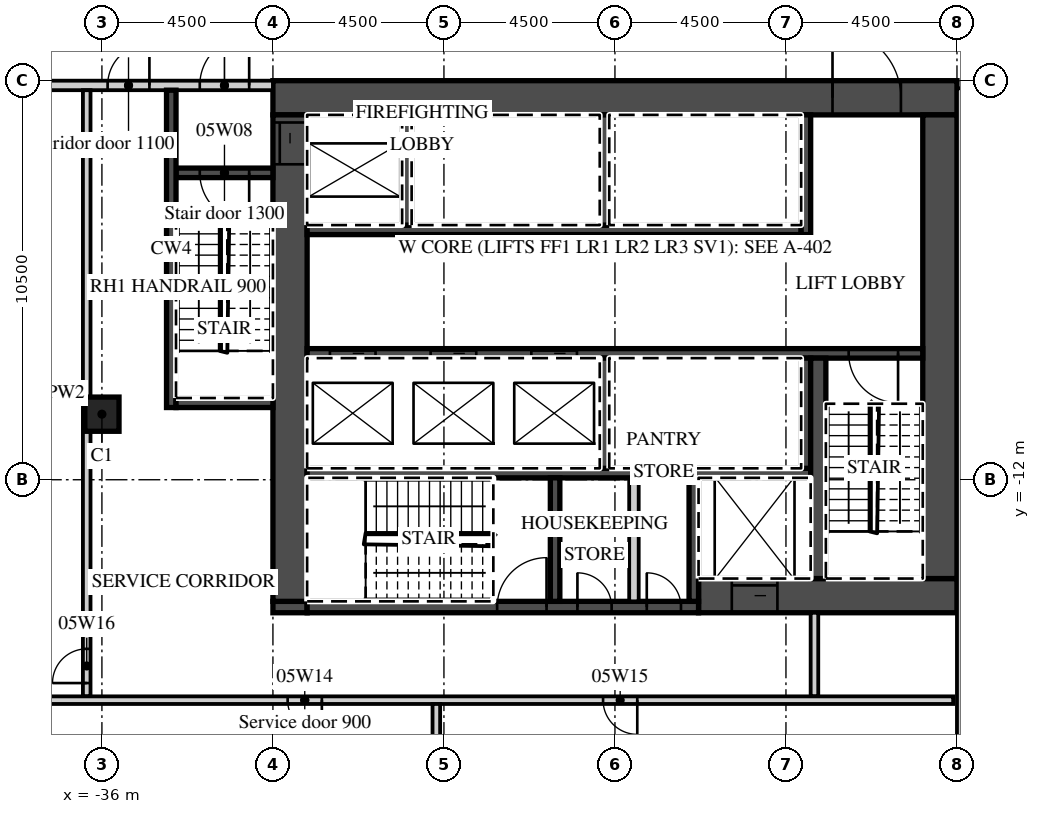
"""IFC4 building model, lengths in metres.
Left out: names, types, materials, properties, quantities, classifications, styles, units other than length and angle.
Written with IfcOpenShell. Run it as: python <this file> out.ifc"""

import sys

from ifc_helpers import new_model, si_unit, direction, frame, frame_2d, origin, origin_2d, place, context, subcontext, project, spatial, rectangle, extrude, element, fill, save


model = new_model("IFC4")
c1 = context("Model", 3, precision=1e-05, world=origin(), true_north=direction((0.0, 1.0)))
c2 = subcontext(c1, "Body", "Model", "MODEL_VIEW")
j1 = project(units=[si_unit("LENGTHUNIT", "METRE"), si_unit("PLANEANGLEUNIT", "RADIAN")], contexts=[c1])
p1 = place(None, origin())
s1 = spatial("IfcSite", under=j1, at=p1, CompositionType="ELEMENT")
p2 = place(p1, origin())
s2 = spatial("IfcBuilding", under=s1, at=p2, CompositionType="ELEMENT")
p3 = place(p2, frame((0.0, 0.0, 33.5)))
s3 = spatial("IfcBuildingStorey", under=s2, at=p3, CompositionType="ELEMENT", Elevation=33.5)
p4 = place(p3, frame((-36.0, -10.275, 0.0), z_axis=(0.0, 0.0, 1.0), x_axis=(1.0, 0.0, 0.0)))
e1 = element("IfcColumn", 1, at=p4, inside=s3, PredefinedType="COLUMN", context=c2, shape_type="SweptSolid", body=[
    extrude(rectangle(XDim=0.9, YDim=0.9, at=origin_2d()), origin(), (0.0, 0.0, 1.0), 4.5),
])
p5 = place(p3, frame((-31.5, -1.95, 0.0), z_axis=(0.0, 0.0, 1.0), x_axis=(1.0, 0.0, 0.0)))
e2 = element("IfcWall", 2, at=p5, inside=s3, PredefinedType="SHEAR", context=c2, shape_type="SweptSolid", body=[
    extrude(rectangle(XDim=18.0, YDim=0.9, at=frame_2d((9.0, 0.0))), origin(), (0.0, 0.0, 1.0), 4.05),
])
p6 = place(p5, frame((14.725, 0.0, 0.0)))
e3 = element("IfcOpeningElement", 3, at=p6, cuts=e2, PredefinedType="OPENING", context=c2, shape_type="SweptSolid", body=[
    extrude(rectangle(XDim=1.8, YDim=2.1, at=frame_2d((0.9, 1.05))), frame((0.0, 0.46, 0.0), z_axis=(0.0, -1.0, 0.0), x_axis=(1.0, 0.0, 0.0)), (0.0, 0.0, 1.0), 0.92),
])
p7 = place(p3, frame((-20.3, -15.05, 0.0), z_axis=(0.0, 0.0, 1.0), x_axis=(1.0, 0.0, 0.0)))
e4 = element("IfcWall", 4, at=p7, inside=s3, PredefinedType="SHEAR", context=c2, shape_type="SweptSolid", body=[
    extrude(rectangle(XDim=6.8, YDim=0.9, at=frame_2d((3.4, 0.0))), origin(), (0.0, 0.0, 1.0), 4.05),
])
p8 = place(p7, frame((0.875, 0.0, 0.0)))
e5 = element("IfcOpeningElement", 5, at=p8, cuts=e4, PredefinedType="OPENING", context=c2, shape_type="SweptSolid", body=[
    extrude(rectangle(XDim=1.2, YDim=2.1, at=frame_2d((0.6, 1.05))), frame((0.0, 0.46, 0.0), z_axis=(0.0, -1.0, 0.0), x_axis=(1.0, 0.0, 0.0)), (0.0, 0.0, 1.0), 0.92),
])
p9 = place(p3, frame((-31.5, -15.35, 0.0), z_axis=(0.0, 0.0, 1.0), x_axis=(1.0, 0.0, 0.0)))
e6 = element("IfcWall", 6, at=p9, inside=s3, PredefinedType="SHEAR", context=c2, shape_type="SweptSolid", body=[
    extrude(rectangle(XDim=0.9, YDim=0.3, at=frame_2d((0.45, 0.0))), origin(), (0.0, 0.0, 1.0), 4.05),
])
p10 = place(p3, frame((-30.6, -15.35, 0.0), z_axis=(0.0, 0.0, 1.0), x_axis=(1.0, 0.0, 0.0)))
e7 = element("IfcWall", 7, at=p10, inside=s3, PredefinedType="SHEAR", context=c2, shape_type="SweptSolid", body=[
    extrude(rectangle(XDim=10.3, YDim=0.3, at=frame_2d((5.15, 0.0))), origin(), (0.0, 0.0, 1.0), 4.05),
])
p11 = place(p10, frame((5.0, 0.0, 0.0)))
e8 = element("IfcOpeningElement", 8, at=p11, cuts=e7, PredefinedType="OPENING", context=c2, shape_type="SweptSolid", body=[
    extrude(rectangle(XDim=1.3, YDim=2.1, at=frame_2d((0.65, 1.05))), frame((0.0, 0.16, 0.0), z_axis=(0.0, -1.0, 0.0), x_axis=(1.0, 0.0, 0.0)), (0.0, 0.0, 1.0), 0.32),
])
p12 = place(p10, frame((7.113, 0.0, 0.0)))
e9 = element("IfcOpeningElement", 9, at=p12, cuts=e7, PredefinedType="OPENING", context=c2, shape_type="SweptSolid", body=[
    extrude(rectangle(XDim=0.9, YDim=2.1, at=frame_2d((0.45, 1.05))), frame((0.0, 0.16, 0.0), z_axis=(0.0, -1.0, 0.0), x_axis=(1.0, 0.0, 0.0)), (0.0, 0.0, 1.0), 0.32),
])
p13 = place(p10, frame((8.938, 0.0, 0.0)))
e10 = element("IfcOpeningElement", 10, at=p13, cuts=e7, PredefinedType="OPENING", context=c2, shape_type="SweptSolid", body=[
    extrude(rectangle(XDim=0.9, YDim=2.1, at=frame_2d((0.45, 1.05))), frame((0.0, 0.16, 0.0), z_axis=(0.0, -1.0, 0.0), x_axis=(1.0, 0.0, 0.0)), (0.0, 0.0, 1.0), 0.32),
])
p14 = place(p3, frame((-31.05, -15.2, 0.0), z_axis=(0.0, 0.0, 1.0), x_axis=(0.0, 1.0, 0.0)))
e11 = element("IfcWall", 11, at=p14, inside=s3, PredefinedType="SHEAR", context=c2, shape_type="SweptSolid", body=[
    extrude(rectangle(XDim=12.8, YDim=0.9, at=frame_2d((6.4, 0.0))), origin(), (0.0, 0.0, 1.0), 4.05),
])
p15 = place(p14, frame((11.5, 0.0, 0.0)))
e12 = element("IfcOpeningElement", 12, at=p15, cuts=e11, PredefinedType="OPENING", context=c2, shape_type="SweptSolid", body=[
    extrude(rectangle(XDim=1.1, YDim=2.1, at=frame_2d((0.55, 1.05))), frame((0.0, 0.46, 0.0), z_axis=(0.0, -1.0, 0.0), x_axis=(1.0, 0.0, 0.0)), (0.0, 0.0, 1.0), 0.92),
])
p16 = place(p3, frame((-13.95, -14.6, 0.0), z_axis=(0.0, 0.0, 1.0), x_axis=(0.0, 1.0, 0.0)))
e13 = element("IfcWall", 13, at=p16, inside=s3, PredefinedType="SHEAR", context=c2, shape_type="SweptSolid", body=[
    extrude(rectangle(XDim=12.2, YDim=0.9, at=frame_2d((6.1, 0.0))), origin(), (0.0, 0.0, 1.0), 4.05),
])
p17 = place(p3, frame((-30.6, -5.425, 0.0), z_axis=(0.0, 0.0, 1.0), x_axis=(1.0, 0.0, 0.0)))
e14 = element("IfcWall", 14, at=p17, inside=s3, PredefinedType="SHEAR", context=c2, shape_type="SweptSolid", body=[
    extrude(rectangle(XDim=13.0, YDim=0.25, at=frame_2d((6.5, 0.0))), origin(), (0.0, 0.0, 1.0), 4.05),
])
p18 = place(p3, frame((-17.475, -5.55, 0.0), z_axis=(0.0, 0.0, 1.0), x_axis=(0.0, 1.0, 0.0)))
e15 = element("IfcWall", 15, at=p18, inside=s3, PredefinedType="SHEAR", context=c2, shape_type="SweptSolid", body=[
    extrude(rectangle(XDim=3.15, YDim=0.25, at=frame_2d((1.575, 0.0))), origin(), (0.0, 0.0, 1.0), 4.05),
])
for number, where, z_axis, x_axis in (
    (16, (-27.975, -5.3, 0.0), (0.0, 0.0, 1.0), (0.0, 1.0, 0.0)),
    (17, (-22.775, -5.3, 0.0), (0.0, 0.0, 1.0), (0.0, 1.0, 0.0)),
):
    element("IfcWall", number, at=place(p3, frame(where, z_axis=z_axis, x_axis=x_axis)), inside=s3, PredefinedType="SHEAR", context=c2, shape_type="SweptSolid", body=[
        extrude(rectangle(XDim=2.9, YDim=0.25, at=frame_2d((1.45, 0.0))), origin(), (0.0, 0.0, 1.0), 4.05),
    ])
p19 = place(p3, frame((-30.6, -8.675, 0.0), z_axis=(0.0, 0.0, 1.0), x_axis=(1.0, 0.0, 0.0)))
e18 = element("IfcWall", 18, at=p19, inside=s3, PredefinedType="SHEAR", context=c2, shape_type="SweptSolid", body=[
    extrude(rectangle(XDim=16.2, YDim=0.25, at=frame_2d((8.1, 0.0))), origin(), (0.0, 0.0, 1.0), 4.05),
])
p20 = place(p19, frame((0.6, 0.0, 0.0)))
e19 = element("IfcOpeningElement", 19, at=p20, cuts=e18, PredefinedType="OPENING", context=c2, shape_type="SweptSolid", body=[
    extrude(rectangle(XDim=1.2, YDim=2.1, at=frame_2d((0.6, 1.05))), frame((0.0, 0.135, 0.0), z_axis=(0.0, -1.0, 0.0), x_axis=(1.0, 0.0, 0.0)), (0.0, 0.0, 1.0), 0.27),
])
p21 = place(p19, frame((3.25, 0.0, 0.0)))
e20 = element("IfcOpeningElement", 20, at=p21, cuts=e18, PredefinedType="OPENING", context=c2, shape_type="SweptSolid", body=[
    extrude(rectangle(XDim=1.2, YDim=2.1, at=frame_2d((0.6, 1.05))), frame((0.0, 0.135, 0.0), z_axis=(0.0, -1.0, 0.0), x_axis=(1.0, 0.0, 0.0)), (0.0, 0.0, 1.0), 0.27),
])
p22 = place(p19, frame((5.9, 0.0, 0.0)))
e21 = element("IfcOpeningElement", 21, at=p22, cuts=e18, PredefinedType="OPENING", context=c2, shape_type="SweptSolid", body=[
    extrude(rectangle(XDim=1.2, YDim=2.1, at=frame_2d((0.6, 1.05))), frame((0.0, 0.135, 0.0), z_axis=(0.0, -1.0, 0.0), x_axis=(1.0, 0.0, 0.0)), (0.0, 0.0, 1.0), 0.27),
])
p23 = place(p19, frame((14.25, 0.0, 0.0)))
e22 = element("IfcOpeningElement", 22, at=p23, cuts=e18, PredefinedType="OPENING", context=c2, shape_type="SweptSolid", body=[
    extrude(rectangle(XDim=1.3, YDim=2.1, at=frame_2d((0.65, 1.05))), frame((0.0, 0.135, 0.0), z_axis=(0.0, -1.0, 0.0), x_axis=(1.0, 0.0, 0.0)), (0.0, 0.0, 1.0), 0.27),
])
p24 = place(p3, frame((-30.6, -11.825, 0.0), z_axis=(0.0, 0.0, 1.0), x_axis=(1.0, 0.0, 0.0)))
e23 = element("IfcWall", 23, at=p24, inside=s3, PredefinedType="SHEAR", context=c2, shape_type="SweptSolid", body=[
    extrude(rectangle(XDim=13.25, YDim=0.25, at=frame_2d((6.625, 0.0))), origin(), (0.0, 0.0, 1.0), 4.05),
])
for number, where, z_axis, x_axis in (
    (24, (-17.475, -11.7, 0.0), (0.0, 0.0, 1.0), (0.0, 1.0, 0.0)),
    (25, (-22.775, -11.7, 0.0), (0.0, 0.0, 1.0), (0.0, 1.0, 0.0)),
):
    element("IfcWall", number, at=place(p3, frame(where, z_axis=z_axis, x_axis=x_axis)), inside=s3, PredefinedType="SHEAR", context=c2, shape_type="SweptSolid", body=[
        extrude(rectangle(XDim=2.9, YDim=0.25, at=frame_2d((1.45, 0.0))), origin(), (0.0, 0.0, 1.0), 4.05),
    ])
p25 = place(p3, frame((-17.15, -14.6, 0.0), z_axis=(0.0, 0.0, 1.0), x_axis=(0.0, 1.0, 0.0)))
e26 = element("IfcWall", 26, at=p25, inside=s3, PredefinedType="SHEAR", context=c2, shape_type="SweptSolid", body=[
    extrude(rectangle(XDim=5.8, YDim=0.4, at=frame_2d((2.9, 0.0))), origin(), (0.0, 0.0, 1.0), 4.05),
])
for number, where, z_axis, x_axis in (
    (27, (-20.425, -15.2, 0.0), (0.0, 0.0, 1.0), (0.0, 1.0, 0.0)),
    (28, (-24.075, -15.2, 0.0), (0.0, 0.0, 1.0), (0.0, 1.0, 0.0)),
):
    element("IfcWall", number, at=place(p3, frame(where, z_axis=z_axis, x_axis=x_axis)), inside=s3, PredefinedType="SHEAR", context=c2, shape_type="SweptSolid", body=[
        extrude(rectangle(XDim=3.25, YDim=0.25, at=frame_2d((1.625, 0.0))), origin(), (0.0, 0.0, 1.0), 4.05),
    ])
p26 = place(p3, frame((-22.0, -15.2, 0.0), z_axis=(0.0, 0.0, 1.0), x_axis=(0.0, 1.0, 0.0)))
e29 = element("IfcWall", 29, at=p26, inside=s3, PredefinedType="PARTITIONING", context=c2, shape_type="SweptSolid", body=[
    extrude(rectangle(XDim=3.25, YDim=0.25, at=frame_2d((1.625, 0.0))), origin(), (0.0, 0.0, 1.0), 4.05),
])
p27 = place(p3, frame((-44.55, -1.625, 0.0), z_axis=(0.0, 0.0, 1.0), x_axis=(1.0, 0.0, 0.0)))
e30 = element("IfcWall", 30, at=p27, inside=s3, PredefinedType="PARTITIONING", context=c2, shape_type="SweptSolid", body=[
    extrude(rectangle(XDim=13.05, YDim=0.25, at=frame_2d((6.525, 0.0))), origin(), (0.0, 0.0, 1.0), 4.05),
])
p28 = place(p27, frame((11.125, 0.0, 0.0)))
e31 = element("IfcOpeningElement", 31, at=p28, cuts=e30, PredefinedType="OPENING", context=c2, shape_type="SweptSolid", body=[
    extrude(rectangle(XDim=1.3, YDim=2.1, at=frame_2d((0.65, 1.05))), frame((0.0, 0.135, 0.0), z_axis=(0.0, -1.0, 0.0), x_axis=(1.0, 0.0, 0.0)), (0.0, 0.0, 1.0), 0.27),
])
p29 = place(p27, frame((8.7, 0.0, 0.0)))
e32 = element("IfcOpeningElement", 32, at=p29, cuts=e30, PredefinedType="OPENING", context=c2, shape_type="SweptSolid", body=[
    extrude(rectangle(XDim=1.1, YDim=2.1, at=frame_2d((0.55, 1.05))), frame((0.0, 0.135, 0.0), z_axis=(0.0, -1.0, 0.0), x_axis=(1.0, 0.0, 0.0)), (0.0, 0.0, 1.0), 0.27),
])
p30 = place(p3, frame((-34.05, -3.925, 0.0), z_axis=(0.0, 0.0, 1.0), x_axis=(1.0, 0.0, 0.0)))
e33 = element("IfcWall", 33, at=p30, inside=s3, PredefinedType="SHEAR", context=c2, shape_type="SweptSolid", body=[
    extrude(rectangle(XDim=2.55, YDim=0.25, at=frame_2d((1.275, 0.0))), origin(), (0.0, 0.0, 1.0), 4.05),
])
p31 = place(p30, frame((0.625, 0.0, 0.0)))
e34 = element("IfcOpeningElement", 34, at=p31, cuts=e33, PredefinedType="OPENING", context=c2, shape_type="SweptSolid", body=[
    extrude(rectangle(XDim=1.3, YDim=2.1, at=frame_2d((0.65, 1.05))), frame((0.0, 0.135, 0.0), z_axis=(0.0, -1.0, 0.0), x_axis=(1.0, 0.0, 0.0)), (0.0, 0.0, 1.0), 0.27),
])
p32 = place(p3, frame((-34.175, -10.1, 0.0), z_axis=(0.0, 0.0, 1.0), x_axis=(0.0, 1.0, 0.0)))
e35 = element("IfcWall", 35, at=p32, inside=s3, PredefinedType="SHEAR", context=c2, shape_type="SweptSolid", body=[
    extrude(rectangle(XDim=8.35, YDim=0.25, at=frame_2d((4.175, 0.0))), origin(), (0.0, 0.0, 1.0), 4.05),
])
p33 = place(p3, frame((-34.05, -9.975, 0.0), z_axis=(0.0, 0.0, 1.0), x_axis=(1.0, 0.0, 0.0)))
e36 = element("IfcWall", 36, at=p33, inside=s3, PredefinedType="SHEAR", context=c2, shape_type="SweptSolid", body=[
    extrude(rectangle(XDim=2.55, YDim=0.25, at=frame_2d((1.275, 0.0))), origin(), (0.0, 0.0, 1.0), 4.05),
])
p34 = place(p3, frame((-17.25, -17.7, 0.0), z_axis=(0.0, 0.0, 1.0), x_axis=(0.0, 1.0, 0.0)))
e37 = element("IfcWall", 37, at=p34, inside=s3, PredefinedType="PARTITIONING", context=c2, shape_type="SweptSolid", body=[
    extrude(rectangle(XDim=2.2, YDim=0.2, at=frame_2d((1.1, 0.0))), origin(), (0.0, 0.0, 1.0), 4.05),
])
p35 = place(p3, frame((-36.4, -17.7, 0.0), z_axis=(0.0, 0.0, 1.0), x_axis=(0.0, 1.0, 0.0)))
e38 = element("IfcWall", 38, at=p35, inside=s3, PredefinedType="PARTITIONING", context=c2, shape_type="SweptSolid", body=[
    extrude(rectangle(XDim=15.95, YDim=0.2, at=frame_2d((7.975, 0.0))), origin(), (0.0, 0.0, 1.0), 4.05),
])
p36 = place(p35, frame((0.35, 0.0, 0.0)))
e39 = element("IfcOpeningElement", 39, at=p36, cuts=e38, PredefinedType="OPENING", context=c2, shape_type="SweptSolid", body=[
    extrude(rectangle(XDim=0.9, YDim=2.1, at=frame_2d((0.45, 1.05))), frame((0.0, 0.11, 0.0), z_axis=(0.0, -1.0, 0.0), x_axis=(1.0, 0.0, 0.0)), (0.0, 0.0, 1.0), 0.22),
])
p37 = place(p3, frame((-44.55, -17.8, 0.0), z_axis=(0.0, 0.0, 1.0), x_axis=(1.0, 0.0, 0.0)))
e40 = element("IfcWall", 40, at=p37, inside=s3, PredefinedType="PARTITIONING", context=c2, shape_type="SweptSolid", body=[
    extrude(rectangle(XDim=30.95, YDim=0.2, at=frame_2d((15.475, 0.0))), origin(), (0.0, 0.0, 1.0), 4.05),
])
p38 = place(p37, frame((13.438, 0.0, 0.0)))
e41 = element("IfcOpeningElement", 41, at=p38, cuts=e40, PredefinedType="OPENING", context=c2, shape_type="SweptSolid", body=[
    extrude(rectangle(XDim=0.9, YDim=2.1, at=frame_2d((0.45, 1.05))), frame((0.0, 0.11, 0.0), z_axis=(0.0, -1.0, 0.0), x_axis=(1.0, 0.0, 0.0)), (0.0, 0.0, 1.0), 0.22),
])
p39 = place(p37, frame((21.738, 0.0, 0.0)))
e42 = element("IfcOpeningElement", 42, at=p39, cuts=e40, PredefinedType="OPENING", context=c2, shape_type="SweptSolid", body=[
    extrude(rectangle(XDim=0.9, YDim=2.1, at=frame_2d((0.45, 1.05))), frame((0.0, 0.11, 0.0), z_axis=(0.0, -1.0, 0.0), x_axis=(1.0, 0.0, 0.0)), (0.0, 0.0, 1.0), 0.22),
])
p40 = place(p3, frame((-27.2, -21.55, 0.0), z_axis=(0.0, 0.0, 1.0), x_axis=(0.0, 1.0, 0.0)))
e43 = element("IfcWall", 43, at=p40, inside=s3, PredefinedType="PARTITIONING", context=c2, shape_type="SweptSolid", body=[
    extrude(rectangle(XDim=3.65, YDim=0.2, at=frame_2d((1.825, 0.0))), origin(), (0.0, 0.0, 1.0), 4.05),
])
p41 = place(p3, frame((-13.4, -21.85, 0.0), z_axis=(0.0, 0.0, 1.0), x_axis=(0.0, 1.0, 0.0)))
e44 = element("IfcWall", 44, at=p41, inside=s3, PredefinedType="PARTITIONING", context=c2, shape_type="SweptSolid", body=[
    extrude(rectangle(XDim=20.15, YDim=0.2, at=frame_2d((10.075, 0.0))), origin(), (0.0, 0.0, 1.0), 4.05),
])
p42 = place(p20, origin())
e45 = element("IfcDoor", 45, at=p42, inside=s3, OperationType="SLIDING_TO_LEFT", PredefinedType="DOOR", context=c2, shape_type="SweptSolid", body=[
    extrude(rectangle(XDim=1.2, YDim=2.1, at=frame_2d((0.6, 1.05))), frame((0.0, 0.025, 0.0), z_axis=(0.0, -1.0, 0.0), x_axis=(1.0, 0.0, 0.0)), (0.0, 0.0, 1.0), 0.05),
])
fill(e19, e45)
p43 = place(p21, origin())
e46 = element("IfcDoor", 46, at=p43, inside=s3, OperationType="SLIDING_TO_RIGHT", PredefinedType="DOOR", context=c2, shape_type="SweptSolid", body=[
    extrude(rectangle(XDim=1.2, YDim=2.1, at=frame_2d((0.6, 1.05))), frame((0.0, 0.025, 0.0), z_axis=(0.0, -1.0, 0.0), x_axis=(1.0, 0.0, 0.0)), (0.0, 0.0, 1.0), 0.05),
])
fill(e20, e46)
p44 = place(p22, origin())
e47 = element("IfcDoor", 47, at=p44, inside=s3, OperationType="SLIDING_TO_RIGHT", PredefinedType="DOOR", context=c2, shape_type="SweptSolid", body=[
    extrude(rectangle(XDim=1.2, YDim=2.1, at=frame_2d((0.6, 1.05))), frame((0.0, 0.025, 0.0), z_axis=(0.0, -1.0, 0.0), x_axis=(1.0, 0.0, 0.0)), (0.0, 0.0, 1.0), 0.05),
])
fill(e21, e47)
p45 = place(p8, origin())
e48 = element("IfcDoor", 48, at=p45, inside=s3, OperationType="SLIDING_TO_LEFT", PredefinedType="DOOR", context=c2, shape_type="SweptSolid", body=[
    extrude(rectangle(XDim=1.2, YDim=2.1, at=frame_2d((0.6, 1.05))), frame((0.0, 0.025, 0.0), z_axis=(0.0, -1.0, 0.0), x_axis=(1.0, 0.0, 0.0)), (0.0, 0.0, 1.0), 0.05),
])
fill(e5, e48)
p46 = place(p15, origin())
e49 = element("IfcDoor", 49, at=p46, inside=s3, OperationType="SLIDING_TO_RIGHT", PredefinedType="DOOR", context=c2, shape_type="SweptSolid", body=[
    extrude(rectangle(XDim=1.1, YDim=2.1, at=frame_2d((0.55, 1.05))), frame((0.0, 0.025, 0.0), z_axis=(0.0, -1.0, 0.0), x_axis=(1.0, 0.0, 0.0)), (0.0, 0.0, 1.0), 0.05),
])
fill(e12, e49)
p47 = place(p6, origin())
e50 = element("IfcDoor", 50, at=p47, inside=s3, OperationType="DOUBLE_DOOR_DOUBLE_SWING", PredefinedType="DOOR", context=c2, shape_type="SweptSolid", body=[
    extrude(rectangle(XDim=1.8, YDim=2.1, at=frame_2d((0.9, 1.05))), frame((0.0, 0.025, 0.0), z_axis=(0.0, -1.0, 0.0), x_axis=(1.0, 0.0, 0.0)), (0.0, 0.0, 1.0), 0.05),
])
fill(e3, e50)
p48 = place(p28, origin())
e51 = element("IfcDoor", 51, at=p48, inside=s3, OperationType="SINGLE_SWING_RIGHT", PredefinedType="DOOR", context=c2, shape_type="SweptSolid", body=[
    extrude(rectangle(XDim=1.3, YDim=2.1, at=frame_2d((0.65, 1.05))), frame((0.0, 0.025, 0.0), z_axis=(0.0, -1.0, 0.0), x_axis=(1.0, 0.0, 0.0)), (0.0, 0.0, 1.0), 0.05),
])
fill(e31, e51)
p49 = place(p31, origin())
e52 = element("IfcDoor", 52, at=p49, inside=s3, OperationType="SINGLE_SWING_RIGHT", PredefinedType="DOOR", context=c2, shape_type="SweptSolid", body=[
    extrude(rectangle(XDim=1.3, YDim=2.1, at=frame_2d((0.65, 1.05))), frame((0.0, 0.025, 0.0), z_axis=(0.0, -1.0, 0.0), x_axis=(1.0, 0.0, 0.0)), (0.0, 0.0, 1.0), 0.05),
])
fill(e34, e52)
p50 = place(p29, origin())
e53 = element("IfcDoor", 53, at=p50, inside=s3, OperationType="SINGLE_SWING_RIGHT", PredefinedType="DOOR", context=c2, shape_type="SweptSolid", body=[
    extrude(rectangle(XDim=1.1, YDim=2.1, at=frame_2d((0.55, 1.05))), frame((0.0, 0.025, 0.0), z_axis=(0.0, -1.0, 0.0), x_axis=(1.0, 0.0, 0.0)), (0.0, 0.0, 1.0), 0.05),
])
fill(e32, e53)
p51 = place(p23, origin())
e54 = element("IfcDoor", 54, at=p51, inside=s3, OperationType="SINGLE_SWING_RIGHT", PredefinedType="DOOR", context=c2, shape_type="SweptSolid", body=[
    extrude(rectangle(XDim=1.3, YDim=2.1, at=frame_2d((0.65, 1.05))), frame((0.0, 0.025, 0.0), z_axis=(0.0, -1.0, 0.0), x_axis=(1.0, 0.0, 0.0)), (0.0, 0.0, 1.0), 0.05),
])
fill(e22, e54)
p52 = place(p11, origin())
e55 = element("IfcDoor", 55, at=p52, inside=s3, OperationType="SINGLE_SWING_RIGHT", PredefinedType="DOOR", context=c2, shape_type="SweptSolid", body=[
    extrude(rectangle(XDim=1.3, YDim=2.1, at=frame_2d((0.65, 1.05))), frame((0.0, 0.025, 0.0), z_axis=(0.0, -1.0, 0.0), x_axis=(1.0, 0.0, 0.0)), (0.0, 0.0, 1.0), 0.05),
])
fill(e8, e55)
p53 = place(p12, origin())
e56 = element("IfcDoor", 56, at=p53, inside=s3, OperationType="SINGLE_SWING_LEFT", PredefinedType="DOOR", context=c2, shape_type="SweptSolid", body=[
    extrude(rectangle(XDim=0.9, YDim=2.1, at=frame_2d((0.45, 1.05))), frame((0.0, 0.025, 0.0), z_axis=(0.0, -1.0, 0.0), x_axis=(1.0, 0.0, 0.0)), (0.0, 0.0, 1.0), 0.05),
])
fill(e9, e56)
p54 = place(p13, origin())
e57 = element("IfcDoor", 57, at=p54, inside=s3, OperationType="SINGLE_SWING_LEFT", PredefinedType="DOOR", context=c2, shape_type="SweptSolid", body=[
    extrude(rectangle(XDim=0.9, YDim=2.1, at=frame_2d((0.45, 1.05))), frame((0.0, 0.025, 0.0), z_axis=(0.0, -1.0, 0.0), x_axis=(1.0, 0.0, 0.0)), (0.0, 0.0, 1.0), 0.05),
])
fill(e10, e57)
p55 = place(p38, origin())
e58 = element("IfcDoor", 58, at=p55, inside=s3, OperationType="SINGLE_SWING_RIGHT", PredefinedType="DOOR", context=c2, shape_type="SweptSolid", body=[
    extrude(rectangle(XDim=0.9, YDim=2.1, at=frame_2d((0.45, 1.05))), frame((0.0, 0.025, 0.0), z_axis=(0.0, -1.0, 0.0), x_axis=(1.0, 0.0, 0.0)), (0.0, 0.0, 1.0), 0.05),
])
fill(e41, e58)
p56 = place(p39, origin())
e59 = element("IfcDoor", 59, at=p56, inside=s3, OperationType="SINGLE_SWING_RIGHT", PredefinedType="DOOR", context=c2, shape_type="SweptSolid", body=[
    extrude(rectangle(XDim=0.9, YDim=2.1, at=frame_2d((0.45, 1.05))), frame((0.0, 0.025, 0.0), z_axis=(0.0, -1.0, 0.0), x_axis=(1.0, 0.0, 0.0)), (0.0, 0.0, 1.0), 0.05),
])
fill(e42, e59)
p57 = place(p36, origin())
e60 = element("IfcDoor", 60, at=p57, inside=s3, OperationType="SINGLE_SWING_LEFT", PredefinedType="DOOR", context=c2, shape_type="SweptSolid", body=[
    extrude(rectangle(XDim=0.9, YDim=2.1, at=frame_2d((0.45, 1.05))), frame((0.0, 0.025, 0.0), z_axis=(0.0, -1.0, 0.0), x_axis=(1.0, 0.0, 0.0)), (0.0, 0.0, 1.0), 0.05),
])
fill(e39, e60)
save(model, sys.argv[1])
